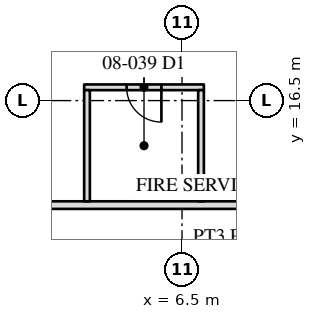
"""IFC4 building model, lengths in metres.
Left out: names, types, materials, properties, quantities, classifications, styles, units other than length and angle.
Written with IfcOpenShell. Run it as: python <this file> out.ifc"""

import sys

from ifc_helpers import new_model, si_unit, direction, frame, frame_2d, origin, place, context, subcontext, project, spatial, rectangle, extrude, element, fill, save


model = new_model("IFC4")
c1 = context("Model", 3, precision=1e-05, world=origin(), true_north=direction((0.0, 1.0)))
c2 = subcontext(c1, "Body", "Model", "MODEL_VIEW")
j1 = project(units=[si_unit("LENGTHUNIT", "METRE"), si_unit("PLANEANGLEUNIT", "RADIAN")], contexts=[c1])
p1 = place(None, origin())
s1 = spatial("IfcSite", under=j1, at=p1, CompositionType="ELEMENT")
p2 = place(p1, origin())
s2 = spatial("IfcBuilding", under=s1, at=p2, CompositionType="ELEMENT")
p3 = place(p2, frame((0.0, 0.0, 36.5)))
s3 = spatial("IfcBuildingStorey", under=s2, at=p3, CompositionType="ELEMENT", Elevation=36.5)
p4 = place(p3, frame((13.85, 13.75, 0.0), z_axis=(0.0, 0.0, 1.0), x_axis=(-1.0, 0.0, 0.0)))
e1 = element("IfcWall", 1, at=p4, inside=s3, PredefinedType="PARTITIONING", context=c2, shape_type="SweptSolid", body=[
    extrude(rectangle(XDim=27.5, YDim=0.2, at=frame_2d((13.75, 0.0))), origin(), (0.0, 0.0, 1.0), 3.91),
])
p5 = place(p3, frame((7.075, 16.85, 0.0), z_axis=(0.0, 0.0, 1.0), x_axis=(-1.0, 0.0, 0.0)))
e2 = element("IfcWall", 2, at=p5, inside=s3, PredefinedType="PARTITIONING", context=c2, shape_type="SweptSolid", body=[
    extrude(rectangle(XDim=3.15, YDim=0.15, at=frame_2d((1.575, 0.0))), origin(), (0.0, 0.0, 1.0), 3.91),
])
p6 = place(p5, frame((1.117, 0.0, 0.0)))
e3 = element("IfcOpeningElement", 3, at=p6, cuts=e2, PredefinedType="OPENING", context=c2, shape_type="SweptSolid", body=[
    extrude(rectangle(XDim=0.915, YDim=2.134, at=frame_2d((0.458, 1.067))), frame((0.0, 0.085, 0.0), z_axis=(0.0, -1.0, 0.0), x_axis=(1.0, 0.0, 0.0)), (0.0, 0.0, 1.0), 0.17),
])
for number, where, z_axis, x_axis in (
    (4, (7.0, 16.775, 0.0), (0.0, 0.0, 1.0), (0.0, -1.0, 0.0)),
    (5, (4.0, 16.775, 0.0), (0.0, 0.0, 1.0), (0.0, -1.0, 0.0)),
):
    element("IfcWall", number, at=place(p3, frame(where, z_axis=z_axis, x_axis=x_axis)), inside=s3, PredefinedType="PARTITIONING", context=c2, shape_type="SweptSolid", body=[
        extrude(rectangle(XDim=2.925, YDim=0.15, at=frame_2d((1.462, 0.0))), origin(), (0.0, 0.0, 1.0), 3.91),
    ])
p7 = place(p6, origin())
e6 = element("IfcDoor", 6, at=p7, inside=s3, OperationType="SINGLE_SWING_LEFT", PredefinedType="DOOR", context=c2, shape_type="SweptSolid", body=[
    extrude(rectangle(XDim=0.915, YDim=2.134, at=frame_2d((0.458, 1.067))), frame((0.0, 0.025, 0.0), z_axis=(0.0, -1.0, 0.0), x_axis=(1.0, 0.0, 0.0)), (0.0, 0.0, 1.0), 0.05),
])
fill(e3, e6)
save(model, sys.argv[1])
